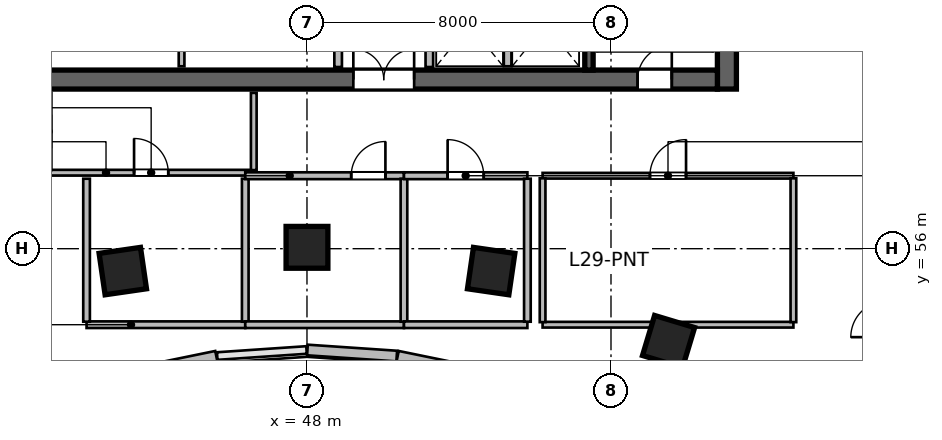
"""IFC4 building model, lengths in metres.
Left out: names, types, materials, properties, quantities, classifications, styles, units other than length and angle.
Written with IfcOpenShell. Run it as: python <this file> out.ifc"""

import sys

from ifc_helpers import new_model, si_unit, direction, frame, frame_2d, origin, origin_2d, place, context, subcontext, project, spatial, rectangle, extrude, source, transform, mapped, element, fill, save


model = new_model("IFC4")
c1 = context("Model", 3, precision=1e-05, world=origin(), true_north=direction((0.0, 1.0)))
c2 = subcontext(c1, "Body", "Model", "MODEL_VIEW")
j1 = project(units=[si_unit("LENGTHUNIT", "METRE"), si_unit("PLANEANGLEUNIT", "RADIAN")], contexts=[c1])
p1 = place(None, origin())
s1 = spatial("IfcSite", under=j1, at=p1, CompositionType="ELEMENT")
p2 = place(p1, origin())
s2 = spatial("IfcBuilding", under=s1, at=p2, CompositionType="ELEMENT")
p3 = place(p2, frame((0.0, 0.0, 123.3)))
s3 = spatial("IfcBuildingStorey", under=s2, at=p3, CompositionType="ELEMENT", Elevation=123.3)
m1 = source(origin(), c2, "Body", "SweptSolid", [
    extrude(rectangle(XDim=12.0, YDim=0.5, at=frame_2d((6.0, 0.0))), origin(), (0.0, 0.0, 1.0), 3.9),
])
p4 = place(p3, frame((59.05, 60.2, 0.0), z_axis=(0.0, 0.0, 1.0), x_axis=(0.0, 1.0, 0.0)))
e1 = element("IfcWall", 1, at=p4, inside=s3, PredefinedType="SHEAR", context=c2, shape_type="MappedRepresentation", body=[
    mapped(m1, transform((0.0, 0.0, 0.0), scale=1.0)),
])
m2 = source(origin(), c2, "Body", "SweptSolid", [
    extrude(rectangle(XDim=21.6, YDim=0.5, at=frame_2d((10.8, 0.0))), origin(), (0.0, 0.0, 1.0), 3.9),
])
p5 = place(p3, frame((37.2, 60.45, 0.0), z_axis=(0.0, 0.0, 1.0), x_axis=(1.0, 0.0, 0.0)))
e2 = element("IfcWall", 2, at=p5, inside=s3, PredefinedType="SHEAR", context=c2, shape_type="MappedRepresentation", body=[
    mapped(m2, transform((0.0, 0.0, 0.0), scale=1.0)),
])
p6 = place(p5, frame((1.1, 0.0, 0.0)))
e3 = element("IfcOpeningElement", 3, at=p6, cuts=e2, PredefinedType="OPENING", context=c2, shape_type="SweptSolid", body=[
    extrude(rectangle(XDim=1.15, YDim=2.15, at=frame_2d((0.575, 1.075))), frame((0.0, 0.26, 0.0), z_axis=(0.0, -1.0, 0.0), x_axis=(1.0, 0.0, 0.0)), (0.0, 0.0, 1.0), 0.52),
])
p7 = place(p5, frame((19.5, 0.0, 0.0)))
e4 = element("IfcOpeningElement", 4, at=p7, cuts=e2, PredefinedType="OPENING", context=c2, shape_type="SweptSolid", body=[
    extrude(rectangle(XDim=0.9, YDim=2.1, at=frame_2d((0.45, 1.05))), frame((0.0, 0.26, 0.0), z_axis=(0.0, -1.0, 0.0), x_axis=(1.0, 0.0, 0.0)), (0.0, 0.0, 1.0), 0.52),
])
p8 = place(p5, frame((12.02, 0.0, 0.0)))
e5 = element("IfcOpeningElement", 5, at=p8, cuts=e2, PredefinedType="OPENING", context=c2, shape_type="SweptSolid", body=[
    extrude(rectangle(XDim=1.6, YDim=2.15, at=frame_2d((0.8, 1.075))), frame((0.0, 0.26, 0.0), z_axis=(0.0, -1.0, 0.0), x_axis=(1.0, 0.0, 0.0)), (0.0, 0.0, 1.0), 0.52),
])
m3 = source(origin(), c2, "Body", "SweptSolid", [
    extrude(rectangle(XDim=11.0, YDim=0.22, at=frame_2d((5.5, 0.0))), origin(), (0.0, 0.0, 1.0), 3.9),
])
p9 = place(p3, frame((55.42, 60.7, 0.0), z_axis=(0.0, 0.0, 1.0), x_axis=(0.0, 1.0, 0.0)))
e6 = element("IfcWall", 6, at=p9, inside=s3, PredefinedType="SHEAR", context=c2, shape_type="MappedRepresentation", body=[
    mapped(m3, transform((0.0, 0.0, 0.0), scale=1.0)),
])
p10 = place(p9, frame((9.545, 0.0, 0.0)))
e7 = element("IfcOpeningElement", 7, at=p10, cuts=e6, PredefinedType="OPENING", context=c2, shape_type="SweptSolid", body=[
    extrude(rectangle(XDim=1.15, YDim=2.15, at=frame_2d((0.575, 1.075))), frame((0.0, 0.12, 0.0), z_axis=(0.0, -1.0, 0.0), x_axis=(1.0, 0.0, 0.0)), (0.0, 0.0, 1.0), 0.24),
])
m4 = source(origin(), c2, "Body", "SweptSolid", [
    extrude(rectangle(XDim=1.1, YDim=1.1, at=origin_2d()), origin(), (0.0, 0.0, 1.0), 3.9),
])
for number, where, z_axis, x_axis in (
    (8, (43.154, 55.411, 0.0), (0.0, 0.0, 1.0), (-0.143, 0.99, 0.0)),
    (9, (48.0, 56.036, 0.0), (0.0, 0.0, 1.0), (0.0, 1.0, 0.0)),
    (10, (52.846, 55.411, 0.0), (0.0, 0.0, 1.0), (0.143, 0.99, 0.0)),
    (11, (57.515, 53.558, 0.0), (0.0, 0.0, 1.0), (0.289, 0.957, 0.0)),
):
    element("IfcColumn", number, at=place(p3, frame(where, z_axis=z_axis, x_axis=x_axis)), inside=s3, PredefinedType="COLUMN", context=c2, shape_type="MappedRepresentation", body=[
        mapped(m4, transform((0.0, 0.0, 0.0), scale=1.0)),
    ])
m5 = source(origin(), c2, "Body", "SweptSolid", [
    extrude(rectangle(XDim=2.374, YDim=0.28, at=frame_2d((1.187, 0.0))), origin(), (0.0, 0.0, 1.0), 3.65),
])
p11 = place(p3, frame((52.711, 52.695, 0.0), z_axis=(0.0, 0.0, 1.0), x_axis=(-0.979619827472, 0.200860632341, 0.0)))
e12 = element("IfcWall", 12, at=p11, inside=s3, PredefinedType="SOLIDWALL", context=c2, shape_type="MappedRepresentation", body=[
    mapped(m5, transform((0.0, 0.0, 0.0), scale=1.0)),
])
m6 = source(origin(), c2, "Body", "SweptSolid", [
    extrude(rectangle(XDim=2.355, YDim=0.28, at=frame_2d((1.177, 0.0))), origin(), (0.0, 0.0, 1.0), 3.65),
])
p12 = place(p3, frame((50.362, 53.175, 0.0), z_axis=(0.0, 0.0, 1.0), x_axis=(-0.997699017577, 0.067798748701, 0.0)))
e13 = element("IfcWall", 13, at=p12, inside=s3, PredefinedType="SOLIDWALL", context=c2, shape_type="MappedRepresentation", body=[
    mapped(m6, transform((0.0, 0.0, 0.0), scale=1.0)),
])
p13 = place(p3, frame((45.614, 53.172, 0.0), z_axis=(0.0, 0.0, 1.0), x_axis=(-0.979619827472, -0.200860632341, 0.0)))
e14 = element("IfcWall", 14, at=p13, inside=s3, PredefinedType="SOLIDWALL", context=c2, shape_type="MappedRepresentation", body=[
    mapped(m5, transform((0.0, 0.0, 0.0), scale=1.0)),
])
m7 = source(origin(), c2, "Body", "SweptSolid", [
    extrude(rectangle(XDim=2.24, YDim=0.2, at=frame_2d((1.12, 0.0))), origin(), (0.0, 0.0, 1.0), 3.65),
])
for number, where, z_axis, x_axis in (
    (15, (48.82, 60.78, 0.0), (0.0, 0.0, 1.0), (0.0, 1.0, 0.0)),
    (16, (51.22, 60.78, 0.0), (0.0, 0.0, 1.0), (0.0, 1.0, 0.0)),
):
    element("IfcWall", number, at=place(p3, frame(where, z_axis=z_axis, x_axis=x_axis)), inside=s3, PredefinedType="SOLIDWALL", context=c2, shape_type="MappedRepresentation", body=[
        mapped(m7, transform((0.0, 0.0, 0.0), scale=1.0)),
    ])
m8 = source(origin(), c2, "Body", "SweptSolid", [
    extrude(rectangle(XDim=2.2, YDim=0.15, at=frame_2d((1.1, 0.0))), origin(), (0.0, 0.0, 1.0), 3.65),
])
p14 = place(p3, frame((44.7, 60.8, 0.0), z_axis=(0.0, 0.0, 1.0), x_axis=(0.0, 1.0, 0.0)))
e17 = element("IfcWall", 17, at=p14, inside=s3, PredefinedType="PARTITIONING", context=c2, shape_type="MappedRepresentation", body=[
    mapped(m8, transform((0.0, 0.0, 0.0), scale=1.0)),
])
m9 = source(origin(), c2, "Body", "SweptSolid", [
    extrude(rectangle(XDim=2.2, YDim=0.2, at=frame_2d((1.1, 0.0))), origin(), (0.0, 0.0, 1.0), 3.65),
])
p15 = place(p3, frame((53.28, 60.8, 0.0), z_axis=(0.0, 0.0, 1.0), x_axis=(0.0, 1.0, 0.0)))
e18 = element("IfcWall", 18, at=p15, inside=s3, PredefinedType="SOLIDWALL", context=c2, shape_type="MappedRepresentation", body=[
    mapped(m9, transform((0.0, 0.0, 0.0), scale=1.0)),
])
m10 = source(origin(), c2, "Body", "SweptSolid", [
    extrude(rectangle(XDim=5.4, YDim=0.15, at=frame_2d((2.7, 0.0))), origin(), (0.0, 0.0, 1.0), 3.65),
])
p16 = place(p3, frame((41.2, 58.0, 0.0), z_axis=(0.0, 0.0, 1.0), x_axis=(1.0, 0.0, 0.0)))
e19 = element("IfcWall", 19, at=p16, inside=s3, PredefinedType="PARTITIONING", context=c2, shape_type="MappedRepresentation", body=[
    mapped(m10, transform((0.0, 0.0, 0.0), scale=1.0)),
])
p17 = place(p16, frame((2.25, 0.0, 0.0)))
e20 = element("IfcOpeningElement", 20, at=p17, cuts=e19, PredefinedType="OPENING", context=c2, shape_type="SweptSolid", body=[
    extrude(rectangle(XDim=0.9, YDim=2.08, at=frame_2d((0.45, 1.04))), frame((0.0, 0.085, 0.0), z_axis=(0.0, -1.0, 0.0), x_axis=(1.0, 0.0, 0.0)), (0.0, 0.0, 1.0), 0.17),
])
m11 = source(origin(), c2, "Body", "SweptSolid", [
    extrude(rectangle(XDim=2.033, YDim=0.15, at=frame_2d((1.016, 0.0))), origin(), (0.0, 0.0, 1.0), 3.65),
])
p18 = place(p3, frame((46.6, 58.067, 0.0), z_axis=(0.0, 0.0, 1.0), x_axis=(0.0, 1.0, 0.0)))
e21 = element("IfcWall", 21, at=p18, inside=s3, PredefinedType="PARTITIONING", context=c2, shape_type="MappedRepresentation", body=[
    mapped(m11, transform((0.0, 0.0, 0.0), scale=1.0)),
])
m12 = source(origin(), c2, "Body", "SweptSolid", [
    extrude(rectangle(XDim=4.176, YDim=0.175, at=frame_2d((2.088, 0.0))), origin(), (0.0, 0.0, 1.0), 3.65),
])
p19 = place(p3, frame((42.2, 54.0, 0.0), z_axis=(0.0, 0.0, 1.0), x_axis=(1.0, 0.0, 0.0)))
e22 = element("IfcWall", 22, at=p19, inside=s3, PredefinedType="PARTITIONING", context=c2, shape_type="MappedRepresentation", body=[
    mapped(m12, transform((0.0, 0.0, 0.0), scale=1.0)),
])
m13 = source(origin(), c2, "Body", "SweptSolid", [
    extrude(rectangle(XDim=3.763, YDim=0.175, at=frame_2d((1.881, 0.0))), origin(), (0.0, 0.0, 1.0), 3.65),
])
for number, where, z_axis, x_axis in (
    (23, (42.2, 54.079, 0.0), (0.0, 0.0, 1.0), (0.0, 1.0, 0.0)),
    (24, (46.376, 54.079, 0.0), (0.0, 0.0, 1.0), (0.0, 1.0, 0.0)),
):
    element("IfcWall", number, at=place(p3, frame(where, z_axis=z_axis, x_axis=x_axis)), inside=s3, PredefinedType="PARTITIONING", context=c2, shape_type="MappedRepresentation", body=[
        mapped(m13, transform((0.0, 0.0, 0.0), scale=1.0)),
    ])
p20 = place(p3, frame((46.376, 54.0, 0.0), z_axis=(0.0, 0.0, 1.0), x_axis=(1.0, 0.0, 0.0)))
e25 = element("IfcWall", 25, at=p20, inside=s3, PredefinedType="PARTITIONING", context=c2, shape_type="MappedRepresentation", body=[
    mapped(m12, transform((0.0, 0.0, 0.0), scale=1.0)),
])
m14 = source(origin(), c2, "Body", "SweptSolid", [
    extrude(rectangle(XDim=4.176, YDim=0.18, at=frame_2d((2.088, 0.0))), origin(), (0.0, 0.0, 1.0), 3.65),
])
p21 = place(p3, frame((46.376, 57.92, 0.0), z_axis=(0.0, 0.0, 1.0), x_axis=(1.0, 0.0, 0.0)))
e26 = element("IfcWall", 26, at=p21, inside=s3, PredefinedType="PLUMBINGWALL", context=c2, shape_type="MappedRepresentation", body=[
    mapped(m14, transform((0.0, 0.0, 0.0), scale=1.0)),
])
p22 = place(p21, frame((2.788, 0.0, 0.0)))
e27 = element("IfcOpeningElement", 27, at=p22, cuts=e26, PredefinedType="OPENING", context=c2, shape_type="SweptSolid", body=[
    extrude(rectangle(XDim=0.9, YDim=2.08, at=frame_2d((0.45, 1.04))), frame((0.0, 0.1, 0.0), z_axis=(0.0, -1.0, 0.0), x_axis=(1.0, 0.0, 0.0)), (0.0, 0.0, 1.0), 0.2),
])
p23 = place(p3, frame((50.552, 54.079, 0.0), z_axis=(0.0, 0.0, 1.0), x_axis=(0.0, 1.0, 0.0)))
e28 = element("IfcWall", 28, at=p23, inside=s3, PredefinedType="PARTITIONING", context=c2, shape_type="MappedRepresentation", body=[
    mapped(m13, transform((0.0, 0.0, 0.0), scale=1.0)),
])
m15 = source(origin(), c2, "Body", "SweptSolid", [
    extrude(rectangle(XDim=3.248, YDim=0.175, at=frame_2d((1.624, 0.0))), origin(), (0.0, 0.0, 1.0), 3.65),
])
p24 = place(p3, frame((50.552, 54.0, 0.0), z_axis=(0.0, 0.0, 1.0), x_axis=(1.0, 0.0, 0.0)))
e29 = element("IfcWall", 29, at=p24, inside=s3, PredefinedType="PARTITIONING", context=c2, shape_type="MappedRepresentation", body=[
    mapped(m15, transform((0.0, 0.0, 0.0), scale=1.0)),
])
m16 = source(origin(), c2, "Body", "SweptSolid", [
    extrude(rectangle(XDim=3.248, YDim=0.18, at=frame_2d((1.624, 0.0))), origin(), (0.0, 0.0, 1.0), 3.65),
])
p25 = place(p3, frame((50.552, 57.92, 0.0), z_axis=(0.0, 0.0, 1.0), x_axis=(1.0, 0.0, 0.0)))
e30 = element("IfcWall", 30, at=p25, inside=s3, PredefinedType="PLUMBINGWALL", context=c2, shape_type="MappedRepresentation", body=[
    mapped(m16, transform((0.0, 0.0, 0.0), scale=1.0)),
])
p26 = place(p25, frame((1.149, 0.0, 0.0)))
e31 = element("IfcOpeningElement", 31, at=p26, cuts=e30, PredefinedType="OPENING", context=c2, shape_type="SweptSolid", body=[
    extrude(rectangle(XDim=0.95, YDim=2.12, at=frame_2d((0.475, 1.06))), frame((0.0, 0.1, 0.0), z_axis=(0.0, -1.0, 0.0), x_axis=(1.0, 0.0, 0.0)), (0.0, 0.0, 1.0), 0.2),
])
p27 = place(p3, frame((53.8, 54.079, 0.0), z_axis=(0.0, 0.0, 1.0), x_axis=(0.0, 1.0, 0.0)))
e32 = element("IfcWall", 32, at=p27, inside=s3, PredefinedType="PARTITIONING", context=c2, shape_type="MappedRepresentation", body=[
    mapped(m13, transform((0.0, 0.0, 0.0), scale=1.0)),
])
m17 = source(origin(), c2, "Body", "SweptSolid", [
    extrude(rectangle(XDim=6.6, YDim=0.15, at=frame_2d((3.3, 0.0))), origin(), (0.0, 0.0, 1.0), 3.095),
])
p28 = place(p3, frame((54.2, 54.0, 0.0), z_axis=(0.0, 0.0, 1.0), x_axis=(1.0, 0.0, 0.0)))
e33 = element("IfcWall", 33, at=p28, inside=s3, PredefinedType="PARTITIONING", context=c2, shape_type="MappedRepresentation", body=[
    mapped(m17, transform((0.0, 0.0, 0.0), scale=1.0)),
])
m18 = source(origin(), c2, "Body", "SweptSolid", [
    extrude(rectangle(XDim=6.6, YDim=0.15, at=frame_2d((3.3, 0.0))), origin(), (0.0, 0.0, 1.0), 3.65),
])
p29 = place(p3, frame((54.2, 57.92, 0.0), z_axis=(0.0, 0.0, 1.0), x_axis=(1.0, 0.0, 0.0)))
e34 = element("IfcWall", 34, at=p29, inside=s3, PredefinedType="PARTITIONING", context=c2, shape_type="MappedRepresentation", body=[
    mapped(m18, transform((0.0, 0.0, 0.0), scale=1.0)),
])
p30 = place(p29, frame((2.825, 0.0, 0.0)))
e35 = element("IfcOpeningElement", 35, at=p30, cuts=e34, PredefinedType="OPENING", context=c2, shape_type="SweptSolid", body=[
    extrude(rectangle(XDim=0.95, YDim=2.1, at=frame_2d((0.475, 1.05))), frame((0.0, 0.085, 0.0), z_axis=(0.0, -1.0, 0.0), x_axis=(1.0, 0.0, 0.0)), (0.0, 0.0, 1.0), 0.17),
])
m19 = source(origin(), c2, "Body", "SweptSolid", [
    extrude(rectangle(XDim=3.785, YDim=0.15, at=frame_2d((1.893, 0.0))), origin(), (0.0, 0.0, 1.0), 3.65),
])
for number, where, z_axis, x_axis in (
    (36, (54.2, 54.067, 0.0), (0.0, 0.0, 1.0), (0.0, 1.0, 0.0)),
    (37, (60.8, 54.067, 0.0), (0.0, 0.0, 1.0), (0.0, 1.0, 0.0)),
):
    element("IfcWall", number, at=place(p3, frame(where, z_axis=z_axis, x_axis=x_axis)), inside=s3, PredefinedType="PARTITIONING", context=c2, shape_type="MappedRepresentation", body=[
        mapped(m19, transform((0.0, 0.0, 0.0), scale=1.0)),
    ])
m20 = source(origin(), c2, "Body", "SweptSolid", [
    extrude(rectangle(XDim=0.9, YDim=2.1, at=frame_2d((0.45, 1.05))), frame((0.0, 0.025, 0.0), z_axis=(0.0, -1.0, 0.0), x_axis=(1.0, 0.0, 0.0)), (0.0, 0.0, 1.0), 0.05),
])
p31 = place(p7, origin())
e38 = element("IfcDoor", 38, at=p31, inside=s3, OperationType="SINGLE_SWING_RIGHT", PredefinedType="DOOR", context=c2, shape_type="MappedRepresentation", body=[
    mapped(m20, transform((0.0, 0.0, 0.0), scale=1.0)),
])
fill(e4, e38)
m21 = source(origin(), c2, "Body", "SweptSolid", [
    extrude(rectangle(XDim=1.6, YDim=2.15, at=frame_2d((0.8, 1.075))), frame((0.0, 0.025, 0.0), z_axis=(0.0, -1.0, 0.0), x_axis=(1.0, 0.0, 0.0)), (0.0, 0.0, 1.0), 0.05),
])
p32 = place(p8, origin())
e39 = element("IfcDoor", 39, at=p32, inside=s3, OperationType="DOUBLE_DOOR_SINGLE_SWING", PredefinedType="DOOR", context=c2, shape_type="MappedRepresentation", body=[
    mapped(m21, transform((0.0, 0.0, 0.0), scale=1.0)),
])
fill(e5, e39)
m22 = source(origin(), c2, "Body", "SweptSolid", [
    extrude(rectangle(XDim=0.9, YDim=2.08, at=frame_2d((0.45, 1.04))), frame((0.0, 0.025, 0.0), z_axis=(0.0, -1.0, 0.0), x_axis=(1.0, 0.0, 0.0)), (0.0, 0.0, 1.0), 0.05),
])
p33 = place(p17, origin())
e40 = element("IfcDoor", 40, at=p33, inside=s3, OperationType="SINGLE_SWING_LEFT", PredefinedType="DOOR", context=c2, shape_type="MappedRepresentation", body=[
    mapped(m22, transform((0.0, 0.0, 0.0), scale=1.0)),
])
fill(e20, e40)
p34 = place(p22, origin())
e41 = element("IfcDoor", 41, at=p34, inside=s3, OperationType="SINGLE_SWING_RIGHT", PredefinedType="DOOR", context=c2, shape_type="MappedRepresentation", body=[
    mapped(m22, transform((0.0, 0.0, 0.0), scale=1.0)),
])
fill(e27, e41)
m23 = source(origin(), c2, "Body", "SweptSolid", [
    extrude(rectangle(XDim=0.95, YDim=2.12, at=frame_2d((0.475, 1.06))), frame((0.0, 0.025, 0.0), z_axis=(0.0, -1.0, 0.0), x_axis=(1.0, 0.0, 0.0)), (0.0, 0.0, 1.0), 0.05),
])
p35 = place(p26, origin())
e42 = element("IfcDoor", 42, at=p35, inside=s3, OperationType="SINGLE_SWING_LEFT", PredefinedType="DOOR", context=c2, shape_type="MappedRepresentation", body=[
    mapped(m23, transform((0.0, 0.0, 0.0), scale=1.0)),
])
fill(e31, e42)
m24 = source(origin(), c2, "Body", "SweptSolid", [
    extrude(rectangle(XDim=0.95, YDim=2.1, at=frame_2d((0.475, 1.05))), frame((0.0, 0.025, 0.0), z_axis=(0.0, -1.0, 0.0), x_axis=(1.0, 0.0, 0.0)), (0.0, 0.0, 1.0), 0.05),
])
p36 = place(p30, origin())
e43 = element("IfcDoor", 43, at=p36, inside=s3, OperationType="SINGLE_SWING_RIGHT", PredefinedType="DOOR", context=c2, shape_type="MappedRepresentation", body=[
    mapped(m24, transform((0.0, 0.0, 0.0), scale=1.0)),
])
fill(e35, e43)
save(model, sys.argv[1])
